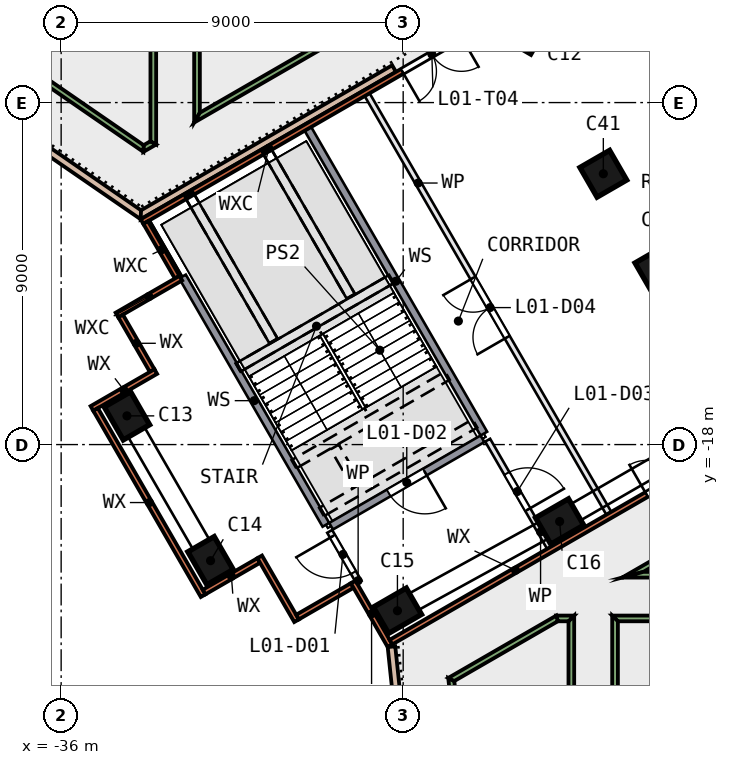
"""IFC4 building model, lengths in metres.
Left out: names, types, materials, properties, quantities, classifications, styles, units other than length and angle.
Written with IfcOpenShell. Run it as: python <this file> out.ifc"""

import sys

from ifc_helpers import new_model, si_unit, direction, frame, frame_2d, origin, origin_2d, place, context, subcontext, project, spatial, polyline, rectangle, outline, extrude, element, fill, save


model = new_model("IFC4")
c1 = context("Model", 3, precision=1e-05, world=origin(), true_north=direction((0.0, 1.0)))
c2 = subcontext(c1, "Body", "Model", "MODEL_VIEW")
j1 = project(units=[si_unit("LENGTHUNIT", "METRE"), si_unit("PLANEANGLEUNIT", "RADIAN")], contexts=[c1])
p1 = place(None, origin())
s1 = spatial("IfcSite", under=j1, at=p1, CompositionType="ELEMENT")
p2 = place(p1, origin())
s2 = spatial("IfcBuilding", under=s1, at=p2, CompositionType="ELEMENT")
p3 = place(p2, frame((0.0, 0.0, 8.0)))
s3 = spatial("IfcBuildingStorey", under=s2, at=p3, CompositionType="ELEMENT", Elevation=8.0)
p4 = place(p3, frame((-23.658, -6.846, 0.0), z_axis=(0.0, 0.0, 1.0), x_axis=(0.5, 0.866025404, 0.0)))
e1 = element("IfcColumn", 1, at=p4, inside=s3, PredefinedType="COLUMN", context=c2, shape_type="SweptSolid", body=[
    extrude(rectangle(XDim=1.5, YDim=0.9, at=origin_2d()), origin(), (0.0, 0.0, 1.0), 5.55),
])
for number, where, z_axis, x_axis in (
    (2, (-34.269, -17.245, 0.0), (0.0, 0.0, 1.0), (0.5, -0.866, 0.0)),
    (3, (-32.069, -21.055, 0.0), (0.0, 0.0, 1.0), (0.5, -0.866, 0.0)),
    (4, (-27.151, -22.373, 0.0), (0.0, 0.0, 1.0), (0.866, 0.5, 0.0)),
    (5, (-22.883, -20.024, 0.0), (0.0, 0.0, 1.0), (0.866, 0.5, 0.0)),
):
    element("IfcColumn", number, at=place(p3, frame(where, z_axis=z_axis, x_axis=x_axis)), inside=s3, PredefinedType="COLUMN", context=c2, shape_type="SweptSolid", body=[
        extrude(rectangle(XDim=1.0, YDim=0.8, at=origin_2d()), origin(), (0.0, 0.0, 1.0), 5.55),
    ])
for number, where, z_axis, x_axis in (
    (6, (-21.733, -10.873, 0.0), (0.0, 0.0, 1.0), (-0.866, -0.5, 0.0)),
    (7, (-20.283, -13.385, 0.0), (0.0, 0.0, 1.0), (-0.866, -0.5, 0.0)),
):
    element("IfcColumn", number, at=place(p3, frame(where, z_axis=z_axis, x_axis=x_axis)), inside=s3, PredefinedType="COLUMN", context=c2, shape_type="SweptSolid", body=[
        extrude(rectangle(XDim=0.9, YDim=0.9, at=origin_2d()), origin(), (0.0, 0.0, 1.0), 5.55),
    ])
p5 = place(p3, frame((-23.995, -6.429, 0.0), z_axis=(0.0, 0.0, 1.0), x_axis=(-0.866018753, -0.500011519, 0.0)))
e8 = element("IfcWall", 8, at=p5, inside=s3, PredefinedType="SOLIDWALL", context=c2, shape_type="SweptSolid", body=[
    extrude(rectangle(XDim=11.405, YDim=0.14, at=frame_2d((5.703, 0.0))), origin(), (0.0, 0.0, 1.0), 5.55),
])
p6 = place(p5, frame((1.698, 0.0, 0.0)))
e9 = element("IfcOpeningElement", 9, at=p6, cuts=e8, PredefinedType="OPENING", context=c2, shape_type="SweptSolid", body=[
    extrude(rectangle(XDim=1.8, YDim=2.4, at=frame_2d((0.9, 1.2))), frame((0.0, 0.08, 0.0), z_axis=(0.0, -1.0, 0.0), x_axis=(1.0, 0.0, 0.0)), (0.0, 0.0, 1.0), 0.16),
])
p7 = place(p3, frame((-33.777, -12.157, 0.0), z_axis=(0.0, 0.0, 1.0), x_axis=(0.499887958, -0.866090081, 0.0)))
e10 = element("IfcWall", 10, at=p7, inside=s3, PredefinedType="SOLIDWALL", context=c2, shape_type="SweptSolid", body=[
    extrude(rectangle(XDim=1.66, YDim=0.14, at=frame_2d((0.83, 0.0))), origin(), (0.0, 0.0, 1.0), 5.55),
])
p8 = place(p3, frame((-32.851, -13.62, 0.0), z_axis=(0.0, 0.0, 1.0), x_axis=(-0.866011627, -0.500023862, 0.0)))
e11 = element("IfcWall", 11, at=p8, inside=s3, PredefinedType="SOLIDWALL", context=c2, shape_type="SweptSolid", body=[
    extrude(rectangle(XDim=1.94, YDim=0.14, at=frame_2d((0.97, 0.0))), origin(), (0.0, 0.0, 1.0), 5.55),
])
p9 = place(p3, frame((-34.436, -14.616, 0.0), z_axis=(0.0, 0.0, 1.0), x_axis=(0.500061949, -0.865989634, 0.0)))
e12 = element("IfcWall", 12, at=p9, inside=s3, PredefinedType="SOLIDWALL", context=c2, shape_type="SweptSolid", body=[
    extrude(rectangle(XDim=1.66, YDim=0.14, at=frame_2d((0.83, 0.0))), origin(), (0.0, 0.0, 1.0), 5.55),
])
p10 = place(p3, frame((-33.51, -16.079, 0.0), z_axis=(0.0, 0.0, 1.0), x_axis=(-0.866011627, -0.500023862, 0.0)))
e13 = element("IfcWall", 13, at=p10, inside=s3, PredefinedType="SOLIDWALL", context=c2, shape_type="SweptSolid", body=[
    extrude(rectangle(XDim=1.94, YDim=0.14, at=frame_2d((0.97, 0.0))), origin(), (0.0, 0.0, 1.0), 5.55),
])
p11 = place(p3, frame((-35.094, -17.075, 0.0), z_axis=(0.0, 0.0, 1.0), x_axis=(0.499998748, -0.866026127, 0.0)))
e14 = element("IfcWall", 14, at=p11, inside=s3, PredefinedType="SOLIDWALL", context=c2, shape_type="SweptSolid", body=[
    extrude(rectangle(XDim=5.66, YDim=0.14, at=frame_2d((2.83, 0.0))), origin(), (0.0, 0.0, 1.0), 5.55),
])
p12 = place(p3, frame((-32.239, -21.881, 0.0), z_axis=(0.0, 0.0, 1.0), x_axis=(0.866026406, 0.499998264, 0.0)))
e15 = element("IfcWall", 15, at=p12, inside=s3, PredefinedType="SOLIDWALL", context=c2, shape_type="SweptSolid", body=[
    extrude(rectangle(XDim=1.66, YDim=0.14, at=frame_2d((0.83, 0.0))), origin(), (0.0, 0.0, 1.0), 5.55),
])
p13 = place(p3, frame((-30.775, -20.955, 0.0), z_axis=(0.0, 0.0, 1.0), x_axis=(0.499969368, -0.866043088, 0.0)))
e16 = element("IfcWall", 16, at=p13, inside=s3, PredefinedType="SOLIDWALL", context=c2, shape_type="SweptSolid", body=[
    extrude(rectangle(XDim=1.94, YDim=0.14, at=frame_2d((0.97, 0.0))), origin(), (0.0, 0.0, 1.0), 5.55),
])
p14 = place(p3, frame((-29.78, -22.54, 0.0), z_axis=(0.0, 0.0, 1.0), x_axis=(0.865989634, 0.500061949, 0.0)))
e17 = element("IfcWall", 17, at=p14, inside=s3, PredefinedType="SOLIDWALL", context=c2, shape_type="SweptSolid", body=[
    extrude(rectangle(XDim=1.66, YDim=0.14, at=frame_2d((0.83, 0.0))), origin(), (0.0, 0.0, 1.0), 5.55),
])
p15 = place(p3, frame((-28.317, -21.614, 0.0), z_axis=(0.0, 0.0, 1.0), x_axis=(0.499969368, -0.866043088, 0.0)))
e18 = element("IfcWall", 18, at=p15, inside=s3, PredefinedType="SOLIDWALL", context=c2, shape_type="SweptSolid", body=[
    extrude(rectangle(XDim=1.94, YDim=0.14, at=frame_2d((0.97, 0.0))), origin(), (0.0, 0.0, 1.0), 5.55),
])
p16 = place(p3, frame((-27.321, -23.198, 0.0), z_axis=(0.0, 0.0, 1.0), x_axis=(0.866030546, 0.499991093, 0.0)))
e19 = element("IfcWall", 19, at=p16, inside=s3, PredefinedType="SOLIDWALL", context=c2, shape_type="SweptSolid", body=[
    extrude(rectangle(XDim=10.961, YDim=0.14, at=frame_2d((5.48, 0.0))), origin(), (0.0, 0.0, 1.0), 5.55),
])
p17 = place(p16, frame((7.767, 0.0, 0.0)))
e20 = element("IfcOpeningElement", 20, at=p17, cuts=e19, PredefinedType="OPENING", context=c2, shape_type="SweptSolid", body=[
    extrude(rectangle(XDim=1.8, YDim=2.4, at=frame_2d((0.9, 1.2))), frame((0.0, 0.08, 0.0), z_axis=(0.0, -1.0, 0.0), x_axis=(1.0, 0.0, 0.0)), (0.0, 0.0, 1.0), 0.16),
])
p18 = place(p3, origin())
e21 = element("IfcWall", 21, at=p18, inside=s3, PredefinedType="SOLIDWALL", context=c2, shape_type="SweptSolid", body=[
    extrude(outline(polyline([(-48.253, -1.943), (-48.457, -2.046), (-33.907, -12.071), (-33.898, -11.834), (-48.253, -1.943)])), origin(), (0.0, 0.0, 1.0), 0.45),
])
p19 = place(p3, origin())
e22 = element("IfcWall", 22, at=p19, inside=s3, PredefinedType="SOLIDWALL", context=c2, shape_type="SweptSolid", body=[
    extrude(outline(polyline([(-33.907, -12.071), (-27.19, -8.192), (-27.29, -8.019), (-33.898, -11.834), (-33.907, -12.071)])), origin(), (0.0, 0.0, 1.0), 0.45),
])
p20 = place(p3, origin())
e23 = element("IfcWall", 23, at=p20, inside=s3, PredefinedType="SOLIDWALL", context=c2, shape_type="SweptSolid", body=[
    extrude(outline(polyline([(-32.5, -0.5), (-32.5, -9.526), (-32.35, -9.267), (-32.35, -0.65), (-32.5, -0.5)])), origin(), (0.0, 0.0, 1.0), 0.6),
])
p21 = place(p3, origin())
e24 = element("IfcWall", 24, at=p21, inside=s3, PredefinedType="SOLIDWALL", context=c2, shape_type="SweptSolid", body=[
    extrude(outline(polyline([(-32.5, -9.526), (-25.758, -5.634), (-25.908, -5.547), (-32.35, -9.267), (-32.5, -9.526)])), origin(), (0.0, 0.0, 1.0), 0.6),
])
p22 = place(p3, origin())
e25 = element("IfcWall", 25, at=p22, inside=s3, PredefinedType="SOLIDWALL", context=c2, shape_type="SweptSolid", body=[
    extrude(outline(polyline([(-33.837, -10.298), (-33.5, -10.104), (-33.65, -10.017), (-33.83, -10.121), (-33.837, -10.298)])), origin(), (0.0, 0.0, 1.0), 0.6),
])
p23 = place(p3, origin())
e26 = element("IfcWall", 26, at=p23, inside=s3, PredefinedType="SOLIDWALL", context=c2, shape_type="SweptSolid", body=[
    extrude(outline(polyline([(-33.5, -10.104), (-33.5, -0.5), (-33.65, -0.65), (-33.65, -10.017), (-33.5, -10.104)])), origin(), (0.0, 0.0, 1.0), 0.6),
])
p24 = place(p3, origin())
e27 = element("IfcWall", 27, at=p24, inside=s3, PredefinedType="SOLIDWALL", context=c2, shape_type="SweptSolid", body=[
    extrude(outline(polyline([(-43.5, -3.639), (-33.837, -10.298), (-33.83, -10.121), (-43.35, -3.561), (-43.5, -3.639)])), origin(), (0.0, 0.0, 1.0), 0.6),
])
p25 = place(p3, origin())
e28 = element("IfcWall", 28, at=p25, inside=s3, PredefinedType="SOLIDWALL", context=c2, shape_type="SweptSolid", body=[
    extrude(outline(polyline([(-27.208, -23.308), (-27.407, -23.329), (-26.0, -36.729), (-25.812, -36.607), (-27.208, -23.308)])), origin(), (0.0, 0.0, 1.0), 0.45),
])
p26 = place(p3, origin())
e29 = element("IfcWall", 29, at=p26, inside=s3, PredefinedType="SOLIDWALL", context=c2, shape_type="SweptSolid", body=[
    extrude(outline(polyline([(-17.758, -19.49), (-21.239, -21.5), (-20.679, -21.35), (-17.758, -19.664), (-17.758, -19.49)])), origin(), (0.0, 0.0, 1.0), 0.6),
])
p27 = place(p3, origin())
e30 = element("IfcWall", 30, at=p27, inside=s3, PredefinedType="SOLIDWALL", context=c2, shape_type="SweptSolid", body=[
    extrude(outline(polyline([(-21.239, -21.5), (-14.278, -21.5), (-14.837, -21.35), (-20.679, -21.35), (-21.239, -21.5)])), origin(), (0.0, 0.0, 1.0), 0.6),
])
p28 = place(p3, origin())
e31 = element("IfcWall", 31, at=p28, inside=s3, PredefinedType="SOLIDWALL", context=c2, shape_type="SweptSolid", body=[
    extrude(outline(polyline([(-12.545, -22.5), (-21.5, -22.5), (-21.35, -22.65), (-12.586, -22.65), (-12.545, -22.5)])), origin(), (0.0, 0.0, 1.0), 0.6),
])
p29 = place(p3, origin())
e32 = element("IfcWall", 32, at=p29, inside=s3, PredefinedType="SOLIDWALL", context=c2, shape_type="SweptSolid", body=[
    extrude(outline(polyline([(-21.5, -22.5), (-21.5, -32.5), (-21.35, -32.35), (-21.35, -22.65), (-21.5, -22.5)])), origin(), (0.0, 0.0, 1.0), 0.6),
])
p30 = place(p3, origin())
e33 = element("IfcWall", 33, at=p30, inside=s3, PredefinedType="SOLIDWALL", context=c2, shape_type="SweptSolid", body=[
    extrude(outline(polyline([(-25.814, -24.141), (-24.936, -32.5), (-24.801, -32.35), (-25.654, -24.222), (-25.814, -24.141)])), origin(), (0.0, 0.0, 1.0), 0.6),
])
p31 = place(p3, origin())
e34 = element("IfcWall", 34, at=p31, inside=s3, PredefinedType="SOLIDWALL", context=c2, shape_type="SweptSolid", body=[
    extrude(outline(polyline([(-22.5, -32.5), (-22.5, -22.5), (-22.65, -22.65), (-22.65, -32.35), (-22.5, -32.5)])), origin(), (0.0, 0.0, 1.0), 0.6),
])
p32 = place(p3, origin())
e35 = element("IfcWall", 35, at=p32, inside=s3, PredefinedType="SOLIDWALL", context=c2, shape_type="SweptSolid", body=[
    extrude(outline(polyline([(-22.5, -22.5), (-22.971, -22.5), (-22.931, -22.65), (-22.65, -22.65), (-22.5, -22.5)])), origin(), (0.0, 0.0, 1.0), 0.6),
])
p33 = place(p3, origin())
e36 = element("IfcWall", 36, at=p33, inside=s3, PredefinedType="SOLIDWALL", context=c2, shape_type="SweptSolid", body=[
    extrude(outline(polyline([(-22.971, -22.5), (-25.814, -24.141), (-25.654, -24.222), (-22.931, -22.65), (-22.971, -22.5)])), origin(), (0.0, 0.0, 1.0), 0.6),
])
p34 = place(p3, frame((-32.807, -13.577, 0.0), z_axis=(0.0, 0.0, 1.0), x_axis=(0.50000534, -0.866022321, 0.0)))
e37 = element("IfcWall", 37, at=p34, inside=s3, PredefinedType="SOLIDWALL", context=c2, shape_type="SweptSolid", body=[
    extrude(rectangle(XDim=7.545, YDim=0.2, at=frame_2d((3.773, 0.0))), origin(), (0.0, 0.0, 1.0), 5.55),
])
p35 = place(p3, frame((-28.162, -21.623, 0.0), z_axis=(0.0, 0.0, 1.0), x_axis=(-0.499877454, 0.866096144, 0.0)))
e38 = element("IfcWall", 38, at=p35, inside=s3, PredefinedType="PARTITIONING", context=c2, shape_type="SweptSolid", body=[
    extrude(rectangle(XDim=1.545, YDim=0.15, at=frame_2d((0.773, 0.0))), origin(), (0.0, 0.0, 1.0), 5.55),
])
p36 = place(p35, frame((0.295, 0.0, 0.0)))
e39 = element("IfcOpeningElement", 39, at=p36, cuts=e38, PredefinedType="OPENING", context=c2, shape_type="SweptSolid", body=[
    extrude(rectangle(XDim=1.1, YDim=2.1, at=frame_2d((0.55, 1.05))), frame((0.0, 0.085, 0.0), z_axis=(0.0, -1.0, 0.0), x_axis=(1.0, 0.0, 0.0)), (0.0, 0.0, 1.0), 0.17),
])
p37 = place(p3, frame((-24.914, -17.848, 0.0), z_axis=(0.0, 0.0, 1.0), x_axis=(-0.86601677, -0.500014953, 0.0)))
e40 = element("IfcWall", 40, at=p37, inside=s3, PredefinedType="SOLIDWALL", context=c2, shape_type="SweptSolid", body=[
    extrude(rectangle(XDim=4.6, YDim=0.2, at=frame_2d((2.3, 0.0))), origin(), (0.0, 0.0, 1.0), 5.55),
])
p38 = place(p37, frame((1.75, 0.0, 0.0)))
e41 = element("IfcOpeningElement", 41, at=p38, cuts=e40, PredefinedType="OPENING", context=c2, shape_type="SweptSolid", body=[
    extrude(rectangle(XDim=1.1, YDim=2.1, at=frame_2d((0.55, 1.05))), frame((0.0, 0.11, 0.0), z_axis=(0.0, -1.0, 0.0), x_axis=(1.0, 0.0, 0.0)), (0.0, 0.0, 1.0), 0.22),
])
p39 = place(p3, frame((-24.877, -17.712, 0.0), z_axis=(0.0, 0.0, 1.0), x_axis=(-0.499984148, 0.866034555, 0.0)))
e42 = element("IfcWall", 42, at=p39, inside=s3, PredefinedType="SOLIDWALL", context=c2, shape_type="SweptSolid", body=[
    extrude(rectangle(XDim=9.26, YDim=0.2, at=frame_2d((4.63, 0.0))), origin(), (0.0, 0.0, 1.0), 5.55),
])
p40 = place(p3, frame((-24.777, -17.885, 0.0), z_axis=(0.0, 0.0, 1.0), x_axis=(0.499996863, -0.866027215, 0.0)))
e43 = element("IfcWall", 43, at=p40, inside=s3, PredefinedType="PARTITIONING", context=c2, shape_type="SweptSolid", body=[
    extrude(rectangle(XDim=3.26, YDim=0.15, at=frame_2d((1.63, 0.0))), origin(), (0.0, 0.0, 1.0), 5.55),
])
p41 = place(p40, frame((1.01, 0.0, 0.0)))
e44 = element("IfcOpeningElement", 44, at=p41, cuts=e43, PredefinedType="OPENING", context=c2, shape_type="SweptSolid", body=[
    extrude(rectangle(XDim=1.1, YDim=2.1, at=frame_2d((0.55, 1.05))), frame((0.0, 0.085, 0.0), z_axis=(0.0, -1.0, 0.0), x_axis=(1.0, 0.0, 0.0)), (0.0, 0.0, 1.0), 0.17),
])
p42 = place(p3, frame((-21.588, -19.808, 0.0), z_axis=(0.0, 0.0, 1.0), x_axis=(-0.499991053, 0.866030569, 0.0)))
e45 = element("IfcWall", 45, at=p42, inside=s3, PredefinedType="PARTITIONING", context=c2, shape_type="SweptSolid", body=[
    extrude(rectangle(XDim=12.72, YDim=0.15, at=frame_2d((6.36, 0.0))), origin(), (0.0, 0.0, 1.0), 5.55),
])
p43 = place(p42, frame((5.35, 0.0, 0.0)))
e46 = element("IfcOpeningElement", 46, at=p43, cuts=e45, PredefinedType="OPENING", context=c2, shape_type="SweptSolid", body=[
    extrude(rectangle(XDim=1.8, YDim=2.1, at=frame_2d((0.9, 1.05))), frame((0.0, 0.085, 0.0), z_axis=(0.0, -1.0, 0.0), x_axis=(1.0, 0.0, 0.0)), (0.0, 0.0, 1.0), 0.17),
])
p44 = place(p6, origin())
e47 = element("IfcDoor", 47, at=p44, inside=s3, OperationType="DOUBLE_DOOR_SINGLE_SWING", PredefinedType="DOOR", context=c2, shape_type="SweptSolid", body=[
    extrude(rectangle(XDim=1.8, YDim=2.4, at=frame_2d((0.9, 1.2))), frame((0.0, 0.025, 0.0), z_axis=(0.0, -1.0, 0.0), x_axis=(1.0, 0.0, 0.0)), (0.0, 0.0, 1.0), 0.05),
])
fill(e9, e47)
p45 = place(p17, origin())
e48 = element("IfcDoor", 48, at=p45, inside=s3, OperationType="DOUBLE_DOOR_SINGLE_SWING", PredefinedType="DOOR", context=c2, shape_type="SweptSolid", body=[
    extrude(rectangle(XDim=1.8, YDim=2.4, at=frame_2d((0.9, 1.2))), frame((0.0, 0.025, 0.0), z_axis=(0.0, -1.0, 0.0), x_axis=(1.0, 0.0, 0.0)), (0.0, 0.0, 1.0), 0.05),
])
fill(e20, e48)
p46 = place(p36, origin())
e49 = element("IfcDoor", 49, at=p46, inside=s3, OperationType="SINGLE_SWING_RIGHT", PredefinedType="DOOR", context=c2, shape_type="SweptSolid", body=[
    extrude(rectangle(XDim=1.1, YDim=2.1, at=frame_2d((0.55, 1.05))), frame((0.0, 0.025, 0.0), z_axis=(0.0, -1.0, 0.0), x_axis=(1.0, 0.0, 0.0)), (0.0, 0.0, 1.0), 0.05),
])
fill(e39, e49)
p47 = place(p38, origin())
e50 = element("IfcDoor", 50, at=p47, inside=s3, OperationType="SINGLE_SWING_LEFT", PredefinedType="DOOR", context=c2, shape_type="SweptSolid", body=[
    extrude(rectangle(XDim=1.1, YDim=2.1, at=frame_2d((0.55, 1.05))), frame((0.0, 0.025, 0.0), z_axis=(0.0, -1.0, 0.0), x_axis=(1.0, 0.0, 0.0)), (0.0, 0.0, 1.0), 0.05),
])
fill(e41, e50)
p48 = place(p41, origin())
e51 = element("IfcDoor", 51, at=p48, inside=s3, OperationType="SINGLE_SWING_RIGHT", PredefinedType="DOOR", context=c2, shape_type="SweptSolid", body=[
    extrude(rectangle(XDim=1.1, YDim=2.1, at=frame_2d((0.55, 1.05))), frame((0.0, 0.025, 0.0), z_axis=(0.0, -1.0, 0.0), x_axis=(1.0, 0.0, 0.0)), (0.0, 0.0, 1.0), 0.05),
])
fill(e44, e51)
p49 = place(p43, origin())
e52 = element("IfcDoor", 52, at=p49, inside=s3, OperationType="DOUBLE_DOOR_SINGLE_SWING", PredefinedType="DOOR", context=c2, shape_type="SweptSolid", body=[
    extrude(rectangle(XDim=1.8, YDim=2.1, at=frame_2d((0.9, 1.05))), frame((0.0, 0.025, 0.0), z_axis=(0.0, -1.0, 0.0), x_axis=(1.0, 0.0, 0.0)), (0.0, 0.0, 1.0), 0.05),
])
fill(e46, e52)
save(model, sys.argv[1])
